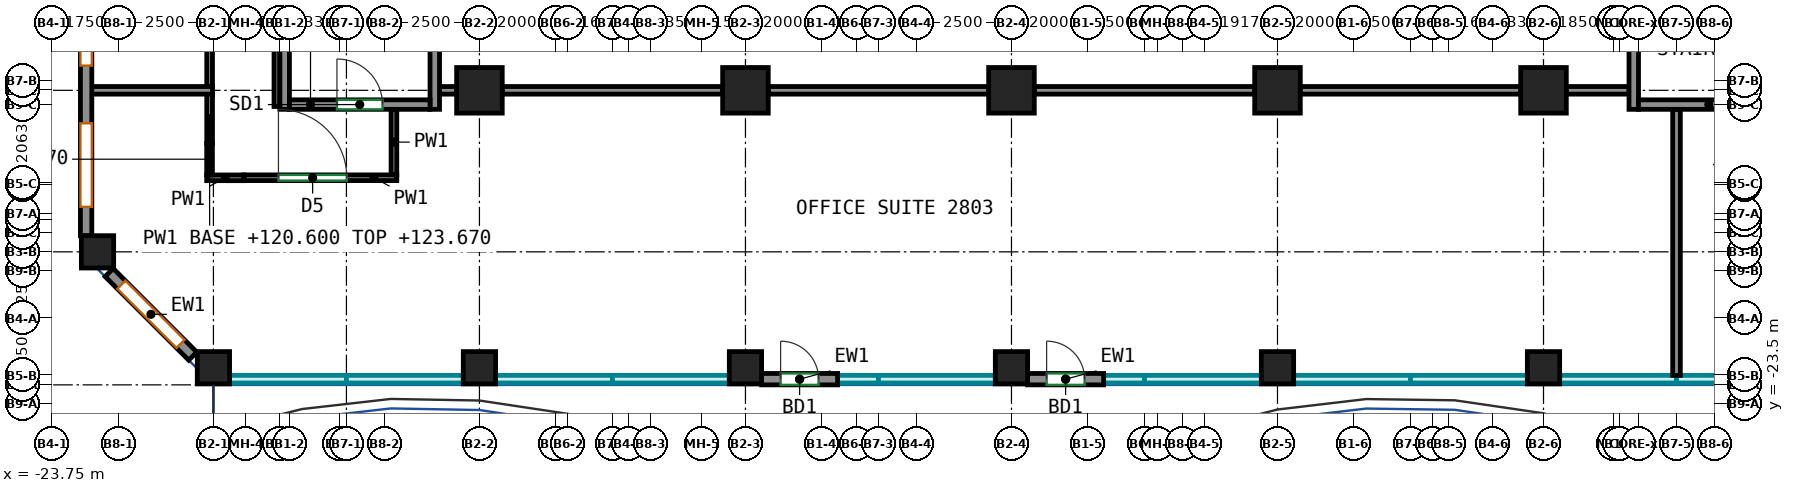
"""IFC4 building model, lengths in metres.
Left out: names, types, materials, properties, quantities, classifications, styles, units other than length and angle.
Written with IfcOpenShell. Run it as: python <this file> out.ifc"""

import sys

from ifc_helpers import new_model, si_unit, direction, frame, frame_2d, origin, origin_2d, place, context, subcontext, project, spatial, rectangle, extrude, source, transform, mapped, element, fill, save


model = new_model("IFC4")
c1 = context("Model", 3, precision=1e-05, world=origin(), true_north=direction((0.0, 1.0)))
c2 = subcontext(c1, "Body", "Model", "MODEL_VIEW")
j1 = project(units=[si_unit("LENGTHUNIT", "METRE"), si_unit("PLANEANGLEUNIT", "RADIAN")], contexts=[c1])
p1 = place(None, origin())
s1 = spatial("IfcSite", under=j1, at=p1, CompositionType="ELEMENT")
p2 = place(p1, origin())
s2 = spatial("IfcBuilding", under=s1, at=p2, CompositionType="ELEMENT")
p3 = place(p2, frame((0.0, 0.0, 120.6)))
s3 = spatial("IfcBuildingStorey", under=s2, at=p3, CompositionType="ELEMENT", Elevation=120.6)
m1 = source(origin(), c2, "Body", "SweptSolid", [
    extrude(rectangle(XDim=0.85, YDim=0.85, at=origin_2d()), origin(), (0.0, 0.0, 1.0), 3.72),
])
for number, where, z_axis, x_axis in (
    (1, (-22.55, -19.5, 0.0), (0.0, 0.0, 1.0), (1.0, 0.0, 0.0)),
    (2, (-19.5, -22.55, 0.0), (0.0, 0.0, 1.0), (1.0, 0.0, 0.0)),
    (3, (-12.5, -22.55, 0.0), (0.0, 0.0, 1.0), (1.0, 0.0, 0.0)),
):
    element("IfcColumn", number, at=place(p3, frame(where, z_axis=z_axis, x_axis=x_axis)), inside=s3, PredefinedType="COLUMN", context=c2, shape_type="MappedRepresentation", body=[
        mapped(m1, transform((0.0, 0.0, 0.0))),
    ])
m2 = source(origin(), c2, "Body", "SweptSolid", [
    extrude(rectangle(XDim=1.2, YDim=1.2, at=origin_2d()), origin(), (0.0, 0.0, 1.0), 3.72),
])
p4 = place(p3, frame((-12.5, -15.25, 0.0), z_axis=(0.0, 0.0, 1.0), x_axis=(1.0, 0.0, 0.0)))
e4 = element("IfcColumn", 4, at=p4, inside=s3, PredefinedType="COLUMN", context=c2, shape_type="MappedRepresentation", body=[
    mapped(m2, transform((0.0, 0.0, 0.0))),
])
p5 = place(p3, frame((-5.5, -22.55, 0.0), z_axis=(0.0, 0.0, 1.0), x_axis=(1.0, 0.0, 0.0)))
e5 = element("IfcColumn", 5, at=p5, inside=s3, PredefinedType="COLUMN", context=c2, shape_type="MappedRepresentation", body=[
    mapped(m1, transform((0.0, 0.0, 0.0))),
])
p6 = place(p3, frame((-5.5, -15.25, 0.0), z_axis=(0.0, 0.0, 1.0), x_axis=(1.0, 0.0, 0.0)))
e6 = element("IfcColumn", 6, at=p6, inside=s3, PredefinedType="COLUMN", context=c2, shape_type="MappedRepresentation", body=[
    mapped(m2, transform((0.0, 0.0, 0.0))),
])
p7 = place(p3, frame((1.5, -22.55, 0.0), z_axis=(0.0, 0.0, 1.0), x_axis=(1.0, 0.0, 0.0)))
e7 = element("IfcColumn", 7, at=p7, inside=s3, PredefinedType="COLUMN", context=c2, shape_type="MappedRepresentation", body=[
    mapped(m1, transform((0.0, 0.0, 0.0))),
])
p8 = place(p3, frame((1.5, -15.25, 0.0), z_axis=(0.0, 0.0, 1.0), x_axis=(1.0, 0.0, 0.0)))
e8 = element("IfcColumn", 8, at=p8, inside=s3, PredefinedType="COLUMN", context=c2, shape_type="MappedRepresentation", body=[
    mapped(m2, transform((0.0, 0.0, 0.0))),
])
p9 = place(p3, frame((8.5, -22.55, 0.0), z_axis=(0.0, 0.0, 1.0), x_axis=(1.0, 0.0, 0.0)))
e9 = element("IfcColumn", 9, at=p9, inside=s3, PredefinedType="COLUMN", context=c2, shape_type="MappedRepresentation", body=[
    mapped(m1, transform((0.0, 0.0, 0.0))),
])
p10 = place(p3, frame((8.5, -15.25, 0.0), z_axis=(0.0, 0.0, 1.0), x_axis=(1.0, 0.0, 0.0)))
e10 = element("IfcColumn", 10, at=p10, inside=s3, PredefinedType="COLUMN", context=c2, shape_type="MappedRepresentation", body=[
    mapped(m2, transform((0.0, 0.0, 0.0))),
])
p11 = place(p3, frame((15.5, -22.55, 0.0), z_axis=(0.0, 0.0, 1.0), x_axis=(1.0, 0.0, 0.0)))
e11 = element("IfcColumn", 11, at=p11, inside=s3, PredefinedType="COLUMN", context=c2, shape_type="MappedRepresentation", body=[
    mapped(m1, transform((0.0, 0.0, 0.0))),
])
p12 = place(p3, frame((15.5, -15.25, 0.0), z_axis=(0.0, 0.0, 1.0), x_axis=(1.0, 0.0, 0.0)))
e12 = element("IfcColumn", 12, at=p12, inside=s3, PredefinedType="COLUMN", context=c2, shape_type="MappedRepresentation", body=[
    mapped(m2, transform((0.0, 0.0, 0.0))),
])
m3 = source(origin(), c2, "Body", "SweptSolid", [
    extrude(rectangle(XDim=8.0, YDim=0.25, at=frame_2d((4.0, 0.0))), origin(), (0.0, 0.0, 1.0), 3.72),
])
for number, where, z_axis, x_axis in (
    (13, (-17.625, -15.75, 0.0), (0.0, 0.0, 1.0), (0.0, 1.0, 0.0)),
    (14, (-13.675, -15.75, 0.0), (0.0, 0.0, 1.0), (0.0, 1.0, 0.0)),
):
    element("IfcWall", number, at=place(p3, frame(where, z_axis=z_axis, x_axis=x_axis)), inside=s3, PredefinedType="SHEAR", context=c2, shape_type="MappedRepresentation", body=[
        mapped(m3, transform((0.0, 0.0, 0.0))),
    ])
m4 = source(origin(), c2, "Body", "SweptSolid", [
    extrude(rectangle(XDim=3.7, YDim=0.25, at=frame_2d((1.85, 0.0))), origin(), (0.0, 0.0, 1.0), 3.72),
])
p13 = place(p3, frame((-17.5, -15.625, 0.0), z_axis=(0.0, 0.0, 1.0), x_axis=(1.0, 0.0, 0.0)))
e15 = element("IfcWall", 15, at=p13, inside=s3, PredefinedType="SHEAR", context=c2, shape_type="MappedRepresentation", body=[
    mapped(m4, transform((0.0, 0.0, 0.0))),
])
p14 = place(p13, frame((1.25, 0.0, 0.0)))
e16 = element("IfcOpeningElement", 16, at=p14, cuts=e15, PredefinedType="OPENING", context=c2, shape_type="SweptSolid", body=[
    extrude(rectangle(XDim=1.2, YDim=2.1, at=frame_2d((0.6, 1.05))), frame((0.0, 0.135, 0.0), z_axis=(0.0, -1.0, 0.0), x_axis=(1.0, 0.0, 0.0)), (0.0, 0.0, 1.0), 0.27),
])
p15 = place(p3, frame((17.875, -15.75, 0.0), z_axis=(0.0, 0.0, 1.0), x_axis=(0.0, 1.0, 0.0)))
e17 = element("IfcWall", 17, at=p15, inside=s3, PredefinedType="SHEAR", context=c2, shape_type="MappedRepresentation", body=[
    mapped(m3, transform((0.0, 0.0, 0.0))),
])
p16 = place(p3, frame((18.0, -15.625, 0.0), z_axis=(0.0, 0.0, 1.0), x_axis=(1.0, 0.0, 0.0)))
e18 = element("IfcWall", 18, at=p16, inside=s3, PredefinedType="SHEAR", context=c2, shape_type="MappedRepresentation", body=[
    mapped(m4, transform((0.0, 0.0, 0.0))),
])
m5 = source(origin(), c2, "Body", "SweptSolid", [
    extrude(rectangle(XDim=2.0, YDim=0.3, at=frame_2d((1.0, 0.0))), origin(), (0.0, 0.0, 1.0), 3.72),
])
p17 = place(p3, frame((-5.075, -22.85, 0.0), z_axis=(0.0, 0.0, 1.0), x_axis=(1.0, 0.0, 0.0)))
e19 = element("IfcWall", 19, at=p17, inside=s3, PredefinedType="SOLIDWALL", context=c2, shape_type="MappedRepresentation", body=[
    mapped(m5, transform((0.0, 0.0, 0.0))),
])
p18 = place(p17, frame((0.5, 0.0, 0.0)))
e20 = element("IfcOpeningElement", 20, at=p18, cuts=e19, PredefinedType="OPENING", context=c2, shape_type="SweptSolid", body=[
    extrude(rectangle(XDim=1.0, YDim=2.1, at=frame_2d((0.5, 1.05))), frame((0.0, 0.16, 0.0), z_axis=(0.0, -1.0, 0.0), x_axis=(1.0, 0.0, 0.0)), (0.0, 0.0, 1.0), 0.32),
])
p19 = place(p3, frame((1.925, -22.85, 0.0), z_axis=(0.0, 0.0, 1.0), x_axis=(1.0, 0.0, 0.0)))
e21 = element("IfcWall", 21, at=p19, inside=s3, PredefinedType="SOLIDWALL", context=c2, shape_type="MappedRepresentation", body=[
    mapped(m5, transform((0.0, 0.0, 0.0))),
])
p20 = place(p19, frame((0.5, 0.0, 0.0)))
e22 = element("IfcOpeningElement", 22, at=p20, cuts=e21, PredefinedType="OPENING", context=c2, shape_type="SweptSolid", body=[
    extrude(rectangle(XDim=1.0, YDim=2.1, at=frame_2d((0.5, 1.05))), frame((0.0, 0.16, 0.0), z_axis=(0.0, -1.0, 0.0), x_axis=(1.0, 0.0, 0.0)), (0.0, 0.0, 1.0), 0.32),
])
m6 = source(origin(), c2, "Body", "SweptSolid", [
    extrude(rectangle(XDim=11.15, YDim=0.3, at=frame_2d((5.575, 0.0))), origin(), (0.0, 0.0, 1.0), 3.72),
])
p21 = place(p3, frame((-22.85, -7.925, 0.0), z_axis=(0.0, 0.0, 1.0), x_axis=(0.0, -1.0, 0.0)))
e23 = element("IfcWall", 23, at=p21, inside=s3, PredefinedType="SOLIDWALL", context=c2, shape_type="MappedRepresentation", body=[
    mapped(m6, transform((0.0, 0.0, 0.0))),
])
p22 = place(p21, frame((0.758, 0.0, 0.7)))
e24 = element("IfcOpeningElement", 24, at=p22, cuts=e23, PredefinedType="OPENING", context=c2, shape_type="SweptSolid", body=[
    extrude(rectangle(XDim=2.2, YDim=2.25, at=frame_2d((1.1, 1.125))), frame((0.0, 0.16, 0.0), z_axis=(0.0, -1.0, 0.0), x_axis=(1.0, 0.0, 0.0)), (0.0, 0.0, 1.0), 0.32),
])
p23 = place(p21, frame((4.475, 0.0, 0.7)))
e25 = element("IfcOpeningElement", 25, at=p23, cuts=e23, PredefinedType="OPENING", context=c2, shape_type="SweptSolid", body=[
    extrude(rectangle(XDim=2.2, YDim=2.25, at=frame_2d((1.1, 1.125))), frame((0.0, 0.16, 0.0), z_axis=(0.0, -1.0, 0.0), x_axis=(1.0, 0.0, 0.0)), (0.0, 0.0, 1.0), 0.32),
])
p24 = place(p21, frame((8.192, 0.0, 0.7)))
e26 = element("IfcOpeningElement", 26, at=p24, cuts=e23, PredefinedType="OPENING", context=c2, shape_type="SweptSolid", body=[
    extrude(rectangle(XDim=2.2, YDim=2.25, at=frame_2d((1.1, 1.125))), frame((0.0, 0.16, 0.0), z_axis=(0.0, -1.0, 0.0), x_axis=(1.0, 0.0, 0.0)), (0.0, 0.0, 1.0), 0.32),
])
m7 = source(origin(), c2, "Body", "SweptSolid", [
    extrude(rectangle(XDim=3.111, YDim=0.3, at=frame_2d((1.556, 0.0))), origin(), (0.0, 0.0, 1.0), 3.72),
])
p25 = place(p3, frame((-22.244, -20.044, 0.0), z_axis=(0.0, 0.0, 1.0), x_axis=(0.707106781187, -0.707106781187, 0.0)))
e27 = element("IfcWall", 27, at=p25, inside=s3, PredefinedType="SOLIDWALL", context=c2, shape_type="MappedRepresentation", body=[
    mapped(m7, transform((0.0, 0.0, 0.0))),
])
p26 = place(p25, frame((0.456, 0.0, 0.7)))
e28 = element("IfcOpeningElement", 28, at=p26, cuts=e27, PredefinedType="OPENING", context=c2, shape_type="SweptSolid", body=[
    extrude(rectangle(XDim=2.2, YDim=2.25, at=frame_2d((1.1, 1.125))), frame((0.0, 0.16, 0.0), z_axis=(0.0, -1.0, 0.0), x_axis=(1.0, 0.0, 0.0)), (0.0, 0.0, 1.0), 0.32),
])
p27 = place(p3, frame((-19.6, -15.16, 0.0), z_axis=(0.0, 0.0, 1.0), x_axis=(0.0, 1.0, 0.0)))
e29 = element("IfcWall", 29, at=p27, inside=s3, PredefinedType="PARTITIONING", context=c2, shape_type="SweptSolid", body=[
    extrude(rectangle(XDim=19.51, YDim=0.15, at=frame_2d((9.755, 0.0))), origin(), (0.0, 0.0, 1.0), 3.07),
])
p28 = place(p27, frame((2.801, 0.0, 0.0)))
e30 = element("IfcOpeningElement", 30, at=p28, cuts=e29, PredefinedType="OPENING", context=c2, shape_type="SweptSolid", body=[
    extrude(rectangle(XDim=1.0, YDim=2.1, at=frame_2d((0.5, 1.05))), frame((0.0, 0.085, 0.0), z_axis=(0.0, -1.0, 0.0), x_axis=(1.0, 0.0, 0.0)), (0.0, 0.0, 1.0), 0.17),
])
p29 = place(p3, frame((-17.83, -15.675, 0.0), z_axis=(0.0, 0.0, 1.0), x_axis=(0.0, 1.0, 0.0)))
e31 = element("IfcWall", 31, at=p29, inside=s3, PredefinedType="PARTITIONING", context=c2, shape_type="SweptSolid", body=[
    extrude(rectangle(XDim=11.96, YDim=0.15, at=frame_2d((5.98, 0.0))), origin(), (0.0, 0.0, 1.0), 3.72),
])
p30 = place(p29, frame((8.249, 0.0, 0.0)))
e32 = element("IfcOpeningElement", 32, at=p30, cuts=e31, PredefinedType="OPENING", context=c2, shape_type="SweptSolid", body=[
    extrude(rectangle(XDim=1.8, YDim=2.1, at=frame_2d((0.9, 1.05))), frame((0.0, 0.085, 0.0), z_axis=(0.0, -1.0, 0.0), x_axis=(1.0, 0.0, 0.0)), (0.0, 0.0, 1.0), 0.17),
])
p31 = place(p3, frame((-19.6, -16.648, 0.0), z_axis=(0.0, 0.0, 1.0), x_axis=(0.0, 1.0, 0.0)))
e33 = element("IfcWall", 33, at=p31, inside=s3, PredefinedType="PARTITIONING", context=c2, shape_type="SweptSolid", body=[
    extrude(rectangle(XDim=1.308, YDim=0.15, at=frame_2d((0.654, 0.0))), origin(), (0.0, 0.0, 1.0), 3.07),
])
p32 = place(p3, frame((-14.75, -17.475, 0.0), z_axis=(0.0, 0.0, 1.0), x_axis=(0.0, 1.0, 0.0)))
e34 = element("IfcWall", 34, at=p32, inside=s3, PredefinedType="PARTITIONING", context=c2, shape_type="SweptSolid", body=[
    extrude(rectangle(XDim=1.725, YDim=0.15, at=frame_2d((0.863, 0.0))), origin(), (0.0, 0.0, 1.0), 3.72),
])
p33 = place(p3, frame((-18.698, -17.55, 0.0), z_axis=(0.0, 0.0, 1.0), x_axis=(1.0, 0.0, 0.0)))
e35 = element("IfcWall", 35, at=p33, inside=s3, PredefinedType="PARTITIONING", context=c2, shape_type="SweptSolid", body=[
    extrude(rectangle(XDim=4.023, YDim=0.15, at=frame_2d((2.011, 0.0))), origin(), (0.0, 0.0, 1.0), 3.72),
])
p34 = place(p33, frame((0.909, 0.0, 0.0)))
e36 = element("IfcOpeningElement", 36, at=p34, cuts=e35, PredefinedType="OPENING", context=c2, shape_type="SweptSolid", body=[
    extrude(rectangle(XDim=1.8, YDim=2.1, at=frame_2d((0.9, 1.05))), frame((0.0, 0.085, 0.0), z_axis=(0.0, -1.0, 0.0), x_axis=(1.0, 0.0, 0.0)), (0.0, 0.0, 1.0), 0.17),
])
p35 = place(p3, frame((-19.677, -17.552, 0.0), z_axis=(0.0, 0.0, 1.0), x_axis=(1.0, 0.0, 0.0)))
e37 = element("IfcWall", 37, at=p35, inside=s3, PredefinedType="PARTITIONING", context=c2, shape_type="SweptSolid", body=[
    extrude(rectangle(XDim=0.979, YDim=0.15, at=frame_2d((0.49, 0.0))), origin(), (0.0, 0.0, 1.0), 3.72),
])
p36 = place(p3, frame((-19.602, -16.648, 0.0), z_axis=(0.0, 0.0, 1.0), x_axis=(0.0, -1.0, 0.0)))
e38 = element("IfcWall", 38, at=p36, inside=s3, PredefinedType="PARTITIONING", context=c2, shape_type="SweptSolid", body=[
    extrude(rectangle(XDim=0.829, YDim=0.15, at=frame_2d((0.415, 0.0))), origin(), (0.0, 0.0, 1.0), 3.07),
])
p37 = place(p3, frame((-22.75, -15.25, 0.0), z_axis=(0.0, 0.0, 1.0), x_axis=(1.0, 0.0, 0.0)))
e39 = element("IfcWall", 39, at=p37, inside=s3, PredefinedType="PARTITIONING", context=c2, shape_type="SweptSolid", body=[
    extrude(rectangle(XDim=3.224, YDim=0.2, at=frame_2d((1.612, 0.0))), origin(), (0.0, 0.0, 1.0), 3.72),
])
p38 = place(p3, frame((16.1, -15.25, 0.0), z_axis=(0.0, 0.0, 1.0), x_axis=(1.0, 0.0, 0.0)))
e40 = element("IfcWall", 40, at=p38, inside=s3, PredefinedType="PARTITIONING", context=c2, shape_type="SweptSolid", body=[
    extrude(rectangle(XDim=1.65, YDim=0.2, at=frame_2d((0.825, 0.0))), origin(), (0.0, 0.0, 1.0), 3.72),
])
for number, where, z_axis, x_axis in (
    (41, (9.1, -15.25, 0.0), (0.0, 0.0, 1.0), (1.0, 0.0, 0.0)),
    (42, (2.1, -15.25, 0.0), (0.0, 0.0, 1.0), (1.0, 0.0, 0.0)),
    (43, (-4.9, -15.25, 0.0), (0.0, 0.0, 1.0), (1.0, 0.0, 0.0)),
    (44, (-11.9, -15.25, 0.0), (0.0, 0.0, 1.0), (1.0, 0.0, 0.0)),
):
    element("IfcWall", number, at=place(p3, frame(where, z_axis=z_axis, x_axis=x_axis)), inside=s3, PredefinedType="PARTITIONING", context=c2, shape_type="SweptSolid", body=[
        extrude(rectangle(XDim=5.8, YDim=0.2, at=frame_2d((2.9, 0.0))), origin(), (0.0, 0.0, 1.0), 3.72),
    ])
p39 = place(p3, frame((-13.6, -15.25, 0.0), z_axis=(0.0, 0.0, 1.0), x_axis=(1.0, 0.0, 0.0)))
e45 = element("IfcWall", 45, at=p39, inside=s3, PredefinedType="PARTITIONING", context=c2, shape_type="SweptSolid", body=[
    extrude(rectangle(XDim=0.5, YDim=0.2, at=frame_2d((0.25, 0.0))), origin(), (0.0, 0.0, 1.0), 3.72),
])
p40 = place(p3, frame((19.0, -22.75, 0.0), z_axis=(0.0, 0.0, 1.0), x_axis=(0.0, 1.0, 0.0)))
e46 = element("IfcWall", 46, at=p40, inside=s3, PredefinedType="PARTITIONING", context=c2, shape_type="SweptSolid", body=[
    extrude(rectangle(XDim=7.0, YDim=0.2, at=frame_2d((3.5, 0.0))), origin(), (0.0, 0.0, 1.0), 3.72),
])
p41 = place(p18, origin())
e47 = element("IfcDoor", 47, at=p41, inside=s3, OperationType="SINGLE_SWING_LEFT", PredefinedType="DOOR", context=c2, shape_type="SweptSolid", body=[
    extrude(rectangle(XDim=1.0, YDim=2.1, at=frame_2d((0.5, 1.05))), frame((0.0, 0.025, 0.0), z_axis=(0.0, -1.0, 0.0), x_axis=(1.0, 0.0, 0.0)), (0.0, 0.0, 1.0), 0.05),
])
fill(e20, e47)
p42 = place(p20, origin())
e48 = element("IfcDoor", 48, at=p42, inside=s3, OperationType="SINGLE_SWING_LEFT", PredefinedType="DOOR", context=c2, shape_type="SweptSolid", body=[
    extrude(rectangle(XDim=1.0, YDim=2.1, at=frame_2d((0.5, 1.05))), frame((0.0, 0.025, 0.0), z_axis=(0.0, -1.0, 0.0), x_axis=(1.0, 0.0, 0.0)), (0.0, 0.0, 1.0), 0.05),
])
fill(e22, e48)
p43 = place(p23, origin())
e49 = element("IfcWindow", 49, at=p43, inside=s3, PartitioningType="SINGLE_PANEL", PredefinedType="WINDOW", context=c2, shape_type="SweptSolid", body=[
    extrude(rectangle(XDim=2.2, YDim=2.25, at=frame_2d((1.1, 1.125))), frame((0.0, 0.03, 0.0), z_axis=(0.0, -1.0, 0.0), x_axis=(1.0, 0.0, 0.0)), (0.0, 0.0, 1.0), 0.06),
])
fill(e25, e49)
p44 = place(p24, origin())
e50 = element("IfcWindow", 50, at=p44, inside=s3, PartitioningType="SINGLE_PANEL", PredefinedType="WINDOW", context=c2, shape_type="SweptSolid", body=[
    extrude(rectangle(XDim=2.2, YDim=2.25, at=frame_2d((1.1, 1.125))), frame((0.0, 0.03, 0.0), z_axis=(0.0, -1.0, 0.0), x_axis=(1.0, 0.0, 0.0)), (0.0, 0.0, 1.0), 0.06),
])
fill(e26, e50)
p45 = place(p26, origin())
e51 = element("IfcWindow", 51, at=p45, inside=s3, PartitioningType="SINGLE_PANEL", PredefinedType="WINDOW", context=c2, shape_type="SweptSolid", body=[
    extrude(rectangle(XDim=2.2, YDim=2.25, at=frame_2d((1.1, 1.125))), frame((0.0, 0.03, 0.0), z_axis=(0.0, -1.0, 0.0), x_axis=(1.0, 0.0, 0.0)), (0.0, 0.0, 1.0), 0.06),
])
fill(e28, e51)
p46 = place(p14, origin())
e52 = element("IfcDoor", 52, at=p46, inside=s3, OperationType="DOUBLE_DOOR_SINGLE_SWING", PredefinedType="DOOR", context=c2, shape_type="SweptSolid", body=[
    extrude(rectangle(XDim=1.2, YDim=2.1, at=frame_2d((0.6, 1.05))), frame((0.0, 0.025, 0.0), z_axis=(0.0, -1.0, 0.0), x_axis=(1.0, 0.0, 0.0)), (0.0, 0.0, 1.0), 0.05),
])
fill(e16, e52)
p47 = place(p34, origin())
e53 = element("IfcDoor", 53, at=p47, inside=s3, OperationType="DOUBLE_DOOR_SINGLE_SWING", PredefinedType="DOOR", context=c2, shape_type="SweptSolid", body=[
    extrude(rectangle(XDim=1.8, YDim=2.1, at=frame_2d((0.9, 1.05))), frame((0.0, 0.025, 0.0), z_axis=(0.0, -1.0, 0.0), x_axis=(1.0, 0.0, 0.0)), (0.0, 0.0, 1.0), 0.05),
])
fill(e36, e53)
save(model, sys.argv[1])
